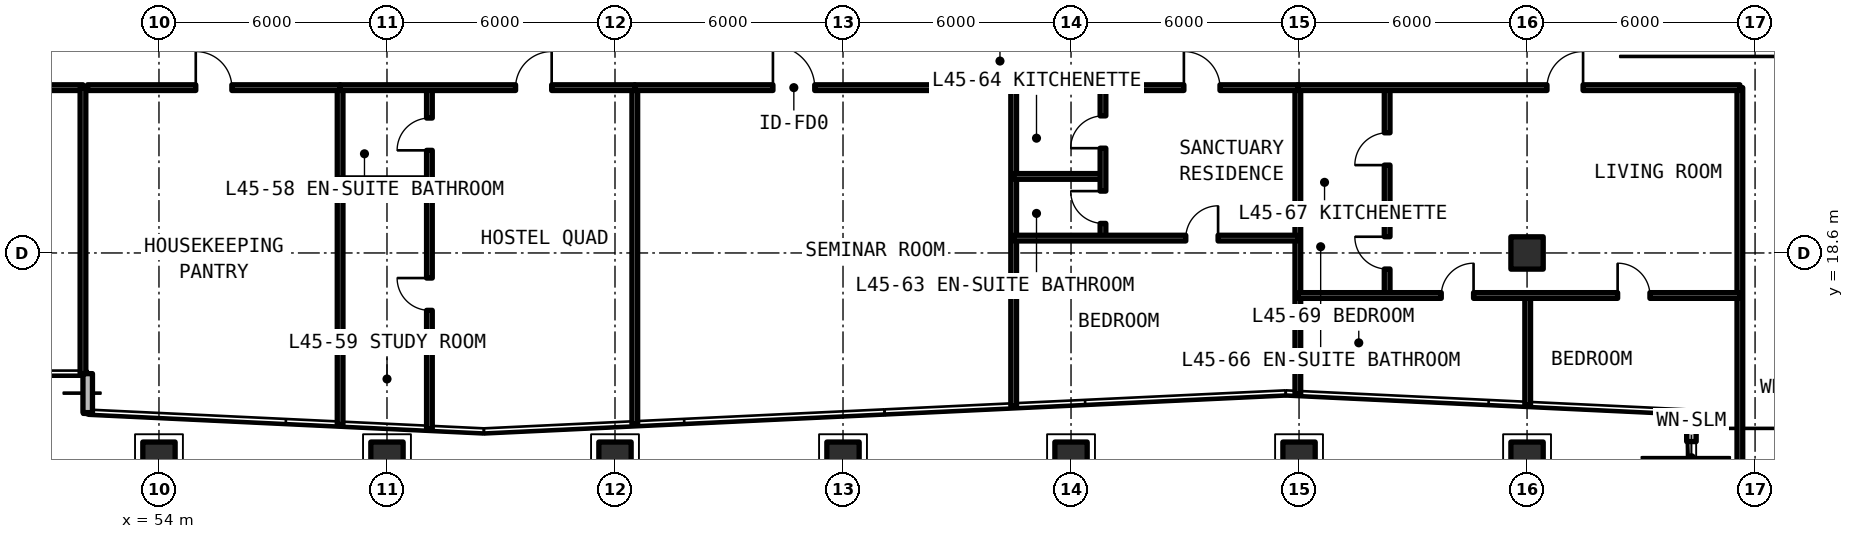
"""IFC4 building model, lengths in metres.
Left out: names, types, materials, properties, quantities, classifications, styles, units other than length and angle.
Written with IfcOpenShell. Run it as: python <this file> out.ifc"""

import sys

from ifc_helpers import new_model, si_unit, direction, frame, frame_2d, origin, origin_2d, place, context, subcontext, project, spatial, rectangle, extrude, element, fill, save


model = new_model("IFC4")
c1 = context("Model", 3, precision=1e-05, world=origin(), true_north=direction((0.0, 1.0)))
c2 = subcontext(c1, "Body", "Model", "MODEL_VIEW")
j1 = project(units=[si_unit("LENGTHUNIT", "METRE"), si_unit("PLANEANGLEUNIT", "RADIAN")], contexts=[c1])
p1 = place(None, origin())
s1 = spatial("IfcSite", under=j1, at=p1, CompositionType="ELEMENT")
p2 = place(p1, origin())
s2 = spatial("IfcBuilding", under=s1, at=p2, CompositionType="ELEMENT")
p3 = place(p2, frame((0.0, 0.0, 162.03)))
s3 = spatial("IfcBuildingStorey", under=s2, at=p3, CompositionType="ELEMENT", Elevation=162.03)
for number, where, z_axis, x_axis in (
    (1, (90.0, 18.6, 0.0), (0.0, 0.0, 1.0), (1.0, 0.0, 0.0)),
    (2, (54.0, 13.2, 0.0), (0.0, 0.0, 1.0), (1.0, 0.0, 0.0)),
    (3, (60.0, 13.2, 0.0), (0.0, 0.0, 1.0), (1.0, 0.0, 0.0)),
    (4, (66.0, 13.2, 0.0), (0.0, 0.0, 1.0), (1.0, 0.0, 0.0)),
    (5, (72.0, 13.2, 0.0), (0.0, 0.0, 1.0), (1.0, 0.0, 0.0)),
    (6, (78.0, 13.2, 0.0), (0.0, 0.0, 1.0), (1.0, 0.0, 0.0)),
    (7, (84.0, 13.2, 0.0), (0.0, 0.0, 1.0), (1.0, 0.0, 0.0)),
    (8, (90.0, 13.2, 0.0), (0.0, 0.0, 1.0), (1.0, 0.0, 0.0)),
):
    element("IfcColumn", number, at=place(p3, frame(where, z_axis=z_axis, x_axis=x_axis)), inside=s3, PredefinedType="COLUMN", context=c2, shape_type="SweptSolid", body=[
        extrude(rectangle(XDim=0.85, YDim=0.85, at=origin_2d()), origin(), (0.0, 0.0, 1.0), 3.63),
    ])
p4 = place(p3, frame((52.125, 15.425, 0.0), z_axis=(0.0, 0.0, 1.0), x_axis=(0.0, -1.0, 0.0)))
e9 = element("IfcWall", 9, at=p4, inside=s3, PredefinedType="SOLIDWALL", context=c2, shape_type="SweptSolid", body=[
    extrude(rectangle(XDim=1.026, YDim=0.25, at=frame_2d((0.513, 0.0))), origin(), (0.0, 0.0, 1.0), 3.41),
])
p5 = place(p3, frame((94.325, 14.399, 0.0), z_axis=(0.0, 0.0, 1.0), x_axis=(0.0, -1.0, 0.0)))
e10 = element("IfcWall", 10, at=p5, inside=s3, PredefinedType="SOLIDWALL", context=c2, shape_type="SweptSolid", body=[
    extrude(rectangle(XDim=2.374, YDim=0.25, at=frame_2d((1.187, 0.0))), origin(), (0.0, 0.0, 1.0), 3.41),
])
p6 = place(p5, frame((0.762, 0.0, 0.78)))
e11 = element("IfcOpeningElement", 11, at=p6, cuts=e10, PredefinedType="OPENING", context=c2, shape_type="SweptSolid", body=[
    extrude(rectangle(XDim=0.85, YDim=1.65, at=frame_2d((0.425, 0.825))), frame((0.0, 0.135, 0.0), z_axis=(0.0, -1.0, 0.0), x_axis=(1.0, 0.0, 0.0)), (0.0, 0.0, 1.0), 0.27),
])
p7 = place(p3, frame((95.748, 12.025, 0.0), z_axis=(0.0, 0.0, 1.0), x_axis=(0.70708586489, 0.707127696864, 0.0)))
e12 = element("IfcWall", 12, at=p7, inside=s3, PredefinedType="SOLIDWALL", context=c2, shape_type="SweptSolid", body=[
    extrude(rectangle(XDim=5.836, YDim=0.25, at=frame_2d((2.918, 0.0))), origin(), (0.0, 0.0, 1.0), 3.41),
])
p8 = place(p7, frame((1.218, 0.0, 0.78)))
e13 = element("IfcOpeningElement", 13, at=p8, cuts=e12, PredefinedType="OPENING", context=c2, shape_type="SweptSolid", body=[
    extrude(rectangle(XDim=3.4, YDim=1.66, at=frame_2d((1.7, 0.83))), frame((0.0, 0.135, 0.0), z_axis=(0.0, -1.0, 0.0), x_axis=(1.0, 0.0, 0.0)), (0.0, 0.0, 1.0), 0.27),
])
p9 = place(p3, frame((43.6, 22.95, 0.0), z_axis=(0.0, 0.0, 1.0), x_axis=(1.0, 0.0, 0.0)))
e14 = element("IfcWall", 14, at=p9, inside=s3, PredefinedType="SOLIDWALL", context=c2, shape_type="SweptSolid", body=[
    extrude(rectangle(XDim=8.4, YDim=0.15, at=frame_2d((4.2, 0.0))), origin(), (0.0, 0.0, 1.0), 2.63),
])
p10 = place(p9, frame((2.3, 0.0, 0.0)))
e15 = element("IfcOpeningElement", 15, at=p10, cuts=e14, PredefinedType="OPENING", context=c2, shape_type="SweptSolid", body=[
    extrude(rectangle(XDim=1.1, YDim=2.15, at=frame_2d((0.55, 1.075))), frame((0.0, 0.085, 0.0), z_axis=(0.0, -1.0, 0.0), x_axis=(1.0, 0.0, 0.0)), (0.0, 0.0, 1.0), 0.17),
])
p11 = place(p3, frame((52.0, 15.425, 0.0), z_axis=(0.0, 0.0, 1.0), x_axis=(0.0, 1.0, 0.0)))
e16 = element("IfcWall", 16, at=p11, inside=s3, PredefinedType="SOLIDWALL", context=c2, shape_type="SweptSolid", body=[
    extrude(rectangle(XDim=7.525, YDim=0.15, at=frame_2d((3.762, 0.0))), origin(), (0.0, 0.0, 1.0), 2.63),
])
p12 = place(p3, frame((95.6, 12.025, 0.0), z_axis=(0.0, 0.0, 1.0), x_axis=(0.0, 1.0, 0.0)))
e17 = element("IfcWall", 17, at=p12, inside=s3, PredefinedType="SOLIDWALL", context=c2, shape_type="SweptSolid", body=[
    extrude(rectangle(XDim=10.925, YDim=0.15, at=frame_2d((5.462, 0.0))), origin(), (0.0, 0.0, 1.0), 2.63),
])
p13 = place(p3, frame((58.767, 14.084, 0.0), z_axis=(0.0, 0.0, 1.0), x_axis=(0.0, 1.0, 0.0)))
e18 = element("IfcWall", 18, at=p13, inside=s3, PredefinedType="SOLIDWALL", context=c2, shape_type="SweptSolid", body=[
    extrude(rectangle(XDim=8.865, YDim=0.15, at=frame_2d((4.433, 0.0))), origin(), (0.0, 0.0, 1.0), 2.63),
])
p14 = place(p3, frame((52.12, 22.95, 0.0), z_axis=(0.0, 0.0, 1.0), x_axis=(1.0, 0.0, 0.0)))
e19 = element("IfcWall", 19, at=p14, inside=s3, PredefinedType="SOLIDWALL", context=c2, shape_type="SweptSolid", body=[
    extrude(rectangle(XDim=6.646, YDim=0.15, at=frame_2d((3.323, 0.0))), origin(), (0.0, 0.0, 1.0), 2.63),
])
p15 = place(p14, frame((2.848, 0.0, 0.0)))
e20 = element("IfcOpeningElement", 20, at=p15, cuts=e19, PredefinedType="OPENING", context=c2, shape_type="SweptSolid", body=[
    extrude(rectangle(XDim=0.95, YDim=2.15, at=frame_2d((0.475, 1.075))), frame((0.0, 0.085, 0.0), z_axis=(0.0, -1.0, 0.0), x_axis=(1.0, 0.0, 0.0)), (0.0, 0.0, 1.0), 0.17),
])
p16 = place(p3, frame((66.521, 14.093, 0.0), z_axis=(0.0, 0.0, 1.0), x_axis=(0.0, 1.0, 0.0)))
e21 = element("IfcWall", 21, at=p16, inside=s3, PredefinedType="SOLIDWALL", context=c2, shape_type="SweptSolid", body=[
    extrude(rectangle(XDim=8.857, YDim=0.15, at=frame_2d((4.428, 0.0))), origin(), (0.0, 0.0, 1.0), 2.63),
])
p17 = place(p3, frame((58.767, 20.5, 0.0), z_axis=(0.0, 0.0, 1.0), x_axis=(1.0, 0.0, 0.0)))
e22 = element("IfcWall", 22, at=p17, inside=s3, PredefinedType="PARTITIONING", context=c2, shape_type="SweptSolid", body=[
    extrude(rectangle(XDim=2.35, YDim=0.15, at=frame_2d((1.175, 0.0))), origin(), (0.0, 0.0, 1.0), 2.63),
])
p18 = place(p3, frame((61.117, 13.973, 0.0), z_axis=(0.0, 0.0, 1.0), x_axis=(0.0, 1.0, 0.0)))
e23 = element("IfcWall", 23, at=p18, inside=s3, PredefinedType="PARTITIONING", context=c2, shape_type="SweptSolid", body=[
    extrude(rectangle(XDim=8.977, YDim=0.15, at=frame_2d((4.489, 0.0))), origin(), (0.0, 0.0, 1.0), 2.63),
])
p19 = place(p18, frame((3.117, 0.0, 0.0)))
e24 = element("IfcOpeningElement", 24, at=p19, cuts=e23, PredefinedType="OPENING", context=c2, shape_type="SweptSolid", body=[
    extrude(rectangle(XDim=0.85, YDim=2.1, at=frame_2d((0.425, 1.05))), frame((0.0, 0.085, 0.0), z_axis=(0.0, -1.0, 0.0), x_axis=(1.0, 0.0, 0.0)), (0.0, 0.0, 1.0), 0.17),
])
p20 = place(p18, frame((7.327, 0.0, 0.0)))
e25 = element("IfcOpeningElement", 25, at=p20, cuts=e23, PredefinedType="OPENING", context=c2, shape_type="SweptSolid", body=[
    extrude(rectangle(XDim=0.85, YDim=2.1, at=frame_2d((0.425, 1.05))), frame((0.0, 0.085, 0.0), z_axis=(0.0, -1.0, 0.0), x_axis=(1.0, 0.0, 0.0)), (0.0, 0.0, 1.0), 0.17),
])
p21 = place(p3, frame((58.767, 22.95, 0.0), z_axis=(0.0, 0.0, 1.0), x_axis=(1.0, 0.0, 0.0)))
e26 = element("IfcWall", 26, at=p21, inside=s3, PredefinedType="SOLIDWALL", context=c2, shape_type="SweptSolid", body=[
    extrude(rectangle(XDim=7.754, YDim=0.15, at=frame_2d((3.877, 0.0))), origin(), (0.0, 0.0, 1.0), 2.63),
])
p22 = place(p21, frame((4.617, 0.0, 0.0)))
e27 = element("IfcOpeningElement", 27, at=p22, cuts=e26, PredefinedType="OPENING", context=c2, shape_type="SweptSolid", body=[
    extrude(rectangle(XDim=0.95, YDim=2.15, at=frame_2d((0.475, 1.075))), frame((0.0, 0.085, 0.0), z_axis=(0.0, -1.0, 0.0), x_axis=(1.0, 0.0, 0.0)), (0.0, 0.0, 1.0), 0.17),
])
p23 = place(p3, frame((76.491, 14.566, 0.0), z_axis=(0.0, 0.0, 1.0), x_axis=(0.0, 1.0, 0.0)))
e28 = element("IfcWall", 28, at=p23, inside=s3, PredefinedType="SOLIDWALL", context=c2, shape_type="SweptSolid", body=[
    extrude(rectangle(XDim=8.384, YDim=0.15, at=frame_2d((4.192, 0.0))), origin(), (0.0, 0.0, 1.0), 2.63),
])
p24 = place(p3, frame((66.521, 22.95, 0.0), z_axis=(0.0, 0.0, 1.0), x_axis=(1.0, 0.0, 0.0)))
e29 = element("IfcWall", 29, at=p24, inside=s3, PredefinedType="SOLIDWALL", context=c2, shape_type="SweptSolid", body=[
    extrude(rectangle(XDim=9.97, YDim=0.15, at=frame_2d((4.985, 0.0))), origin(), (0.0, 0.0, 1.0), 2.63),
])
p25 = place(p24, frame((3.635, 0.0, 0.0)))
e30 = element("IfcOpeningElement", 30, at=p25, cuts=e29, PredefinedType="OPENING", context=c2, shape_type="SweptSolid", body=[
    extrude(rectangle(XDim=1.1, YDim=2.15, at=frame_2d((0.55, 1.075))), frame((0.0, 0.085, 0.0), z_axis=(0.0, -1.0, 0.0), x_axis=(1.0, 0.0, 0.0)), (0.0, 0.0, 1.0), 0.17),
])
p26 = place(p3, frame((83.969, 14.89, 0.0), z_axis=(0.0, 0.0, 1.0), x_axis=(0.0, 1.0, 0.0)))
e31 = element("IfcWall", 31, at=p26, inside=s3, PredefinedType="SOLIDWALL", context=c2, shape_type="SweptSolid", body=[
    extrude(rectangle(XDim=8.06, YDim=0.15, at=frame_2d((4.03, 0.0))), origin(), (0.0, 0.0, 1.0), 2.63),
])
p27 = place(p3, frame((76.491, 20.614, 0.0), z_axis=(0.0, 0.0, 1.0), x_axis=(1.0, 0.0, 0.0)))
e32 = element("IfcWall", 32, at=p27, inside=s3, PredefinedType="PARTITIONING", context=c2, shape_type="SweptSolid", body=[
    extrude(rectangle(XDim=2.35, YDim=0.15, at=frame_2d((1.175, 0.0))), origin(), (0.0, 0.0, 1.0), 2.63),
])
p28 = place(p3, frame((78.841, 18.991, 0.0), z_axis=(0.0, 0.0, 1.0), x_axis=(0.0, 1.0, 0.0)))
e33 = element("IfcWall", 33, at=p28, inside=s3, PredefinedType="PARTITIONING", context=c2, shape_type="SweptSolid", body=[
    extrude(rectangle(XDim=3.959, YDim=0.15, at=frame_2d((1.979, 0.0))), origin(), (0.0, 0.0, 1.0), 2.63),
])
p29 = place(p28, frame((0.387, 0.0, 0.0)))
e34 = element("IfcOpeningElement", 34, at=p29, cuts=e33, PredefinedType="OPENING", context=c2, shape_type="SweptSolid", body=[
    extrude(rectangle(XDim=0.85, YDim=2.1, at=frame_2d((0.425, 1.05))), frame((0.0, 0.085, 0.0), z_axis=(0.0, -1.0, 0.0), x_axis=(1.0, 0.0, 0.0)), (0.0, 0.0, 1.0), 0.17),
])
p30 = place(p28, frame((2.366, 0.0, 0.0)))
e35 = element("IfcOpeningElement", 35, at=p30, cuts=e33, PredefinedType="OPENING", context=c2, shape_type="SweptSolid", body=[
    extrude(rectangle(XDim=0.85, YDim=2.1, at=frame_2d((0.425, 1.05))), frame((0.0, 0.085, 0.0), z_axis=(0.0, -1.0, 0.0), x_axis=(1.0, 0.0, 0.0)), (0.0, 0.0, 1.0), 0.17),
])
p31 = place(p3, frame((76.491, 18.991, 0.0), z_axis=(0.0, 0.0, 1.0), x_axis=(1.0, 0.0, 0.0)))
e36 = element("IfcWall", 36, at=p31, inside=s3, PredefinedType="PARTITIONING", context=c2, shape_type="SweptSolid", body=[
    extrude(rectangle(XDim=7.478, YDim=0.15, at=frame_2d((3.739, 0.0))), origin(), (0.0, 0.0, 1.0), 2.63),
])
p32 = place(p31, frame((4.529, 0.0, 0.0)))
e37 = element("IfcOpeningElement", 37, at=p32, cuts=e36, PredefinedType="OPENING", context=c2, shape_type="SweptSolid", body=[
    extrude(rectangle(XDim=0.85, YDim=2.1, at=frame_2d((0.425, 1.05))), frame((0.0, 0.085, 0.0), z_axis=(0.0, -1.0, 0.0), x_axis=(1.0, 0.0, 0.0)), (0.0, 0.0, 1.0), 0.17),
])
p33 = place(p3, frame((76.491, 22.95, 0.0), z_axis=(0.0, 0.0, 1.0), x_axis=(1.0, 0.0, 0.0)))
e38 = element("IfcWall", 38, at=p33, inside=s3, PredefinedType="SOLIDWALL", context=c2, shape_type="SweptSolid", body=[
    extrude(rectangle(XDim=7.478, YDim=0.15, at=frame_2d((3.739, 0.0))), origin(), (0.0, 0.0, 1.0), 2.63),
])
p34 = place(p33, frame((4.479, 0.0, 0.0)))
e39 = element("IfcOpeningElement", 39, at=p34, cuts=e38, PredefinedType="OPENING", context=c2, shape_type="SweptSolid", body=[
    extrude(rectangle(XDim=0.95, YDim=2.15, at=frame_2d((0.475, 1.075))), frame((0.0, 0.085, 0.0), z_axis=(0.0, -1.0, 0.0), x_axis=(1.0, 0.0, 0.0)), (0.0, 0.0, 1.0), 0.17),
])
p35 = place(p3, frame((83.969, 19.723, 0.0), z_axis=(0.0, 0.0, 1.0), x_axis=(1.0, 0.0, 0.0)))
e40 = element("IfcWall", 40, at=p35, inside=s3, PredefinedType="PARTITIONING", context=c2, shape_type="SweptSolid", body=[
    extrude(rectangle(XDim=2.35, YDim=0.15, at=frame_2d((1.175, 0.0))), origin(), (0.0, 0.0, 1.0), 2.63),
])
p36 = place(p3, frame((86.318, 17.481, 0.0), z_axis=(0.0, 0.0, 1.0), x_axis=(0.0, 1.0, 0.0)))
e41 = element("IfcWall", 41, at=p36, inside=s3, PredefinedType="PARTITIONING", context=c2, shape_type="SweptSolid", body=[
    extrude(rectangle(XDim=5.469, YDim=0.15, at=frame_2d((2.734, 0.0))), origin(), (0.0, 0.0, 1.0), 2.63),
])
p37 = place(p36, frame((0.696, 0.0, 0.0)))
e42 = element("IfcOpeningElement", 42, at=p37, cuts=e41, PredefinedType="OPENING", context=c2, shape_type="SweptSolid", body=[
    extrude(rectangle(XDim=0.85, YDim=2.1, at=frame_2d((0.425, 1.05))), frame((0.0, 0.085, 0.0), z_axis=(0.0, -1.0, 0.0), x_axis=(1.0, 0.0, 0.0)), (0.0, 0.0, 1.0), 0.17),
])
p38 = place(p36, frame((3.431, 0.0, 0.0)))
e43 = element("IfcOpeningElement", 43, at=p38, cuts=e41, PredefinedType="OPENING", context=c2, shape_type="SweptSolid", body=[
    extrude(rectangle(XDim=0.85, YDim=2.1, at=frame_2d((0.425, 1.05))), frame((0.0, 0.085, 0.0), z_axis=(0.0, -1.0, 0.0), x_axis=(1.0, 0.0, 0.0)), (0.0, 0.0, 1.0), 0.17),
])
p39 = place(p3, frame((90.017, 14.604, 0.0), z_axis=(0.0, 0.0, 1.0), x_axis=(0.0, 1.0, 0.0)))
e44 = element("IfcWall", 44, at=p39, inside=s3, PredefinedType="PARTITIONING", context=c2, shape_type="SweptSolid", body=[
    extrude(rectangle(XDim=2.877, YDim=0.15, at=frame_2d((1.439, 0.0))), origin(), (0.0, 0.0, 1.0), 2.63),
])
p40 = place(p3, frame((83.969, 17.481, 0.0), z_axis=(0.0, 0.0, 1.0), x_axis=(1.0, 0.0, 0.0)))
e45 = element("IfcWall", 45, at=p40, inside=s3, PredefinedType="PARTITIONING", context=c2, shape_type="SweptSolid", body=[
    extrude(rectangle(XDim=11.632, YDim=0.15, at=frame_2d((5.816, 0.0))), origin(), (0.0, 0.0, 1.0), 2.63),
])
p41 = place(p40, frame((3.774, 0.0, 0.0)))
e46 = element("IfcOpeningElement", 46, at=p41, cuts=e45, PredefinedType="OPENING", context=c2, shape_type="SweptSolid", body=[
    extrude(rectangle(XDim=0.85, YDim=2.1, at=frame_2d((0.425, 1.05))), frame((0.0, 0.085, 0.0), z_axis=(0.0, -1.0, 0.0), x_axis=(1.0, 0.0, 0.0)), (0.0, 0.0, 1.0), 0.17),
])
p42 = place(p40, frame((8.415, 0.0, 0.0)))
e47 = element("IfcOpeningElement", 47, at=p42, cuts=e45, PredefinedType="OPENING", context=c2, shape_type="SweptSolid", body=[
    extrude(rectangle(XDim=0.85, YDim=2.1, at=frame_2d((0.425, 1.05))), frame((0.0, 0.085, 0.0), z_axis=(0.0, -1.0, 0.0), x_axis=(1.0, 0.0, 0.0)), (0.0, 0.0, 1.0), 0.17),
])
p43 = place(p3, frame((83.969, 22.95, 0.0), z_axis=(0.0, 0.0, 1.0), x_axis=(1.0, 0.0, 0.0)))
e48 = element("IfcWall", 48, at=p43, inside=s3, PredefinedType="SOLIDWALL", context=c2, shape_type="SweptSolid", body=[
    extrude(rectangle(XDim=11.632, YDim=0.15, at=frame_2d((5.816, 0.0))), origin(), (0.0, 0.0, 1.0), 2.63),
])
p44 = place(p43, frame((6.556, 0.0, 0.0)))
e49 = element("IfcOpeningElement", 49, at=p44, cuts=e48, PredefinedType="OPENING", context=c2, shape_type="SweptSolid", body=[
    extrude(rectangle(XDim=0.95, YDim=2.15, at=frame_2d((0.475, 1.075))), frame((0.0, 0.085, 0.0), z_axis=(0.0, -1.0, 0.0), x_axis=(1.0, 0.0, 0.0)), (0.0, 0.0, 1.0), 0.17),
])
p45 = place(p6, origin())
e50 = element("IfcWindow", 50, at=p45, inside=s3, PartitioningType="SINGLE_PANEL", PredefinedType="WINDOW", context=c2, shape_type="SweptSolid", body=[
    extrude(rectangle(XDim=0.85, YDim=1.65, at=frame_2d((0.425, 0.825))), frame((0.0, 0.03, 0.0), z_axis=(0.0, -1.0, 0.0), x_axis=(1.0, 0.0, 0.0)), (0.0, 0.0, 1.0), 0.06),
])
fill(e11, e50)
p46 = place(p15, origin())
e51 = element("IfcDoor", 51, at=p46, inside=s3, OperationType="SINGLE_SWING_LEFT", PredefinedType="DOOR", context=c2, shape_type="SweptSolid", body=[
    extrude(rectangle(XDim=0.95, YDim=2.15, at=frame_2d((0.475, 1.075))), frame((0.0, 0.025, 0.0), z_axis=(0.0, -1.0, 0.0), x_axis=(1.0, 0.0, 0.0)), (0.0, 0.0, 1.0), 0.05),
])
fill(e20, e51)
p47 = place(p19, origin())
e52 = element("IfcDoor", 52, at=p47, inside=s3, OperationType="SINGLE_SWING_RIGHT", PredefinedType="DOOR", context=c2, shape_type="SweptSolid", body=[
    extrude(rectangle(XDim=0.85, YDim=2.1, at=frame_2d((0.425, 1.05))), frame((0.0, 0.025, 0.0), z_axis=(0.0, -1.0, 0.0), x_axis=(1.0, 0.0, 0.0)), (0.0, 0.0, 1.0), 0.05),
])
fill(e24, e52)
p48 = place(p20, origin())
e53 = element("IfcDoor", 53, at=p48, inside=s3, OperationType="SINGLE_SWING_LEFT", PredefinedType="DOOR", context=c2, shape_type="SweptSolid", body=[
    extrude(rectangle(XDim=0.85, YDim=2.1, at=frame_2d((0.425, 1.05))), frame((0.0, 0.025, 0.0), z_axis=(0.0, -1.0, 0.0), x_axis=(1.0, 0.0, 0.0)), (0.0, 0.0, 1.0), 0.05),
])
fill(e25, e53)
p49 = place(p22, origin())
e54 = element("IfcDoor", 54, at=p49, inside=s3, OperationType="SINGLE_SWING_RIGHT", PredefinedType="DOOR", context=c2, shape_type="SweptSolid", body=[
    extrude(rectangle(XDim=0.95, YDim=2.15, at=frame_2d((0.475, 1.075))), frame((0.0, 0.025, 0.0), z_axis=(0.0, -1.0, 0.0), x_axis=(1.0, 0.0, 0.0)), (0.0, 0.0, 1.0), 0.05),
])
fill(e27, e54)
p50 = place(p25, origin())
e55 = element("IfcDoor", 55, at=p50, inside=s3, OperationType="SINGLE_SWING_LEFT", PredefinedType="DOOR", context=c2, shape_type="SweptSolid", body=[
    extrude(rectangle(XDim=1.1, YDim=2.15, at=frame_2d((0.55, 1.075))), frame((0.0, 0.025, 0.0), z_axis=(0.0, -1.0, 0.0), x_axis=(1.0, 0.0, 0.0)), (0.0, 0.0, 1.0), 0.05),
])
fill(e30, e55)
p51 = place(p29, origin())
e56 = element("IfcDoor", 56, at=p51, inside=s3, OperationType="SINGLE_SWING_RIGHT", PredefinedType="DOOR", context=c2, shape_type="SweptSolid", body=[
    extrude(rectangle(XDim=0.85, YDim=2.1, at=frame_2d((0.425, 1.05))), frame((0.0, 0.025, 0.0), z_axis=(0.0, -1.0, 0.0), x_axis=(1.0, 0.0, 0.0)), (0.0, 0.0, 1.0), 0.05),
])
fill(e34, e56)
p52 = place(p30, origin())
e57 = element("IfcDoor", 57, at=p52, inside=s3, OperationType="SINGLE_SWING_LEFT", PredefinedType="DOOR", context=c2, shape_type="SweptSolid", body=[
    extrude(rectangle(XDim=0.85, YDim=2.1, at=frame_2d((0.425, 1.05))), frame((0.0, 0.025, 0.0), z_axis=(0.0, -1.0, 0.0), x_axis=(1.0, 0.0, 0.0)), (0.0, 0.0, 1.0), 0.05),
])
fill(e35, e57)
p53 = place(p32, origin())
e58 = element("IfcDoor", 58, at=p53, inside=s3, OperationType="SINGLE_SWING_RIGHT", PredefinedType="DOOR", context=c2, shape_type="SweptSolid", body=[
    extrude(rectangle(XDim=0.85, YDim=2.1, at=frame_2d((0.425, 1.05))), frame((0.0, 0.025, 0.0), z_axis=(0.0, -1.0, 0.0), x_axis=(1.0, 0.0, 0.0)), (0.0, 0.0, 1.0), 0.05),
])
fill(e37, e58)
p54 = place(p34, origin())
e59 = element("IfcDoor", 59, at=p54, inside=s3, OperationType="SINGLE_SWING_LEFT", PredefinedType="DOOR", context=c2, shape_type="SweptSolid", body=[
    extrude(rectangle(XDim=0.95, YDim=2.15, at=frame_2d((0.475, 1.075))), frame((0.0, 0.025, 0.0), z_axis=(0.0, -1.0, 0.0), x_axis=(1.0, 0.0, 0.0)), (0.0, 0.0, 1.0), 0.05),
])
fill(e39, e59)
p55 = place(p37, origin())
e60 = element("IfcDoor", 60, at=p55, inside=s3, OperationType="SINGLE_SWING_RIGHT", PredefinedType="DOOR", context=c2, shape_type="SweptSolid", body=[
    extrude(rectangle(XDim=0.85, YDim=2.1, at=frame_2d((0.425, 1.05))), frame((0.0, 0.025, 0.0), z_axis=(0.0, -1.0, 0.0), x_axis=(1.0, 0.0, 0.0)), (0.0, 0.0, 1.0), 0.05),
])
fill(e42, e60)
p56 = place(p38, origin())
e61 = element("IfcDoor", 61, at=p56, inside=s3, OperationType="SINGLE_SWING_LEFT", PredefinedType="DOOR", context=c2, shape_type="SweptSolid", body=[
    extrude(rectangle(XDim=0.85, YDim=2.1, at=frame_2d((0.425, 1.05))), frame((0.0, 0.025, 0.0), z_axis=(0.0, -1.0, 0.0), x_axis=(1.0, 0.0, 0.0)), (0.0, 0.0, 1.0), 0.05),
])
fill(e43, e61)
p57 = place(p41, origin())
e62 = element("IfcDoor", 62, at=p57, inside=s3, OperationType="SINGLE_SWING_RIGHT", PredefinedType="DOOR", context=c2, shape_type="SweptSolid", body=[
    extrude(rectangle(XDim=0.85, YDim=2.1, at=frame_2d((0.425, 1.05))), frame((0.0, 0.025, 0.0), z_axis=(0.0, -1.0, 0.0), x_axis=(1.0, 0.0, 0.0)), (0.0, 0.0, 1.0), 0.05),
])
fill(e46, e62)
p58 = place(p42, origin())
e63 = element("IfcDoor", 63, at=p58, inside=s3, OperationType="SINGLE_SWING_LEFT", PredefinedType="DOOR", context=c2, shape_type="SweptSolid", body=[
    extrude(rectangle(XDim=0.85, YDim=2.1, at=frame_2d((0.425, 1.05))), frame((0.0, 0.025, 0.0), z_axis=(0.0, -1.0, 0.0), x_axis=(1.0, 0.0, 0.0)), (0.0, 0.0, 1.0), 0.05),
])
fill(e47, e63)
p59 = place(p44, origin())
e64 = element("IfcDoor", 64, at=p59, inside=s3, OperationType="SINGLE_SWING_RIGHT", PredefinedType="DOOR", context=c2, shape_type="SweptSolid", body=[
    extrude(rectangle(XDim=0.95, YDim=2.15, at=frame_2d((0.475, 1.075))), frame((0.0, 0.025, 0.0), z_axis=(0.0, -1.0, 0.0), x_axis=(1.0, 0.0, 0.0)), (0.0, 0.0, 1.0), 0.05),
])
fill(e49, e64)
save(model, sys.argv[1])
